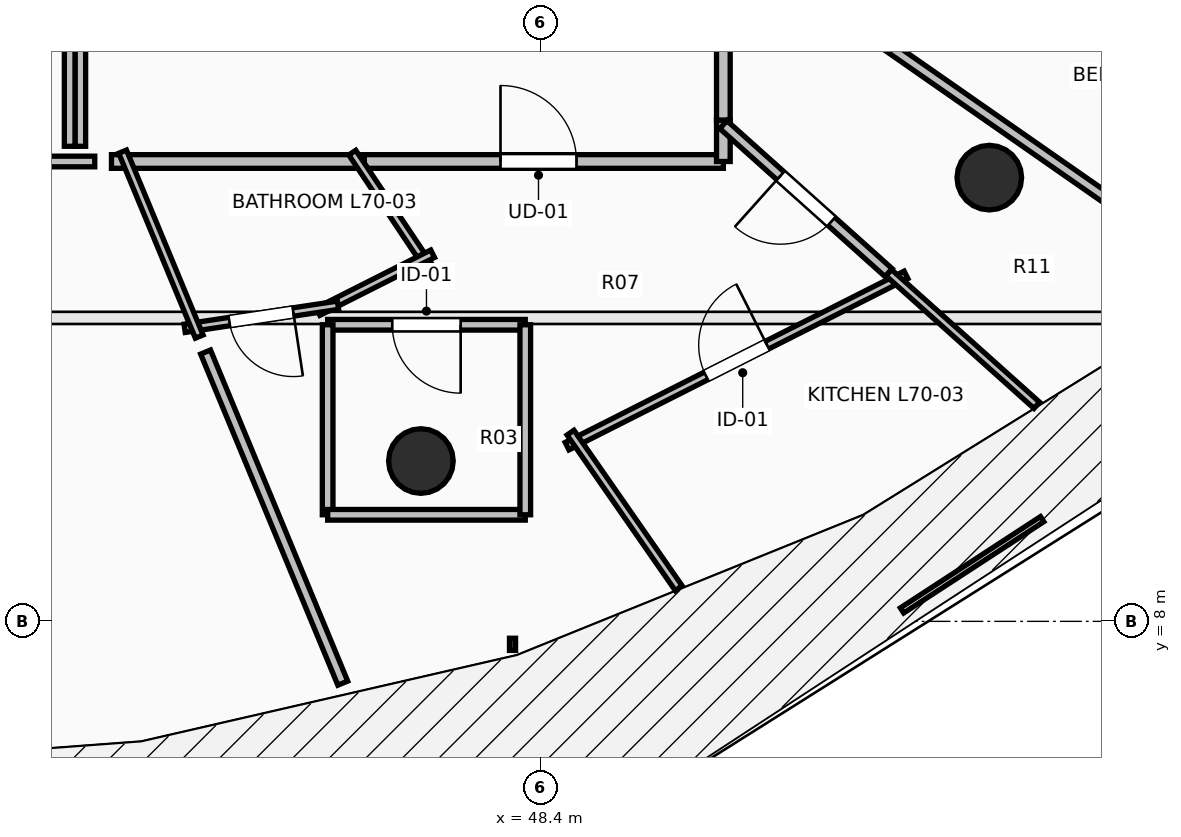
"""IFC4 building model, lengths in metres.
Left out: names, types, materials, properties, quantities, classifications, styles, units other than length and angle.
Written with IfcOpenShell. Run it as: python <this file> out.ifc"""

import sys

from ifc_helpers import new_model, si_unit, direction, frame, frame_2d, origin, origin_2d, place, context, subcontext, project, spatial, rectangle, circle, extrude, element, fill, save


model = new_model("IFC4")
c1 = context("Model", 3, precision=1e-05, world=origin(), true_north=direction((0.0, 1.0)))
c2 = subcontext(c1, "Body", "Model", "MODEL_VIEW")
j1 = project(units=[si_unit("LENGTHUNIT", "METRE"), si_unit("PLANEANGLEUNIT", "RADIAN")], contexts=[c1])
p1 = place(None, origin())
s1 = spatial("IfcSite", under=j1, at=p1, CompositionType="ELEMENT")
p2 = place(p1, origin())
s2 = spatial("IfcBuilding", under=s1, at=p2, CompositionType="ELEMENT")
p3 = place(p2, frame((0.0, 0.0, 259.1)))
s3 = spatial("IfcBuildingStorey", under=s2, at=p3, CompositionType="ELEMENT", Elevation=259.1)
for number, where, z_axis, x_axis in (
    (1, (46.821, 10.109, 0.0), (0.0, 0.0, 1.0), (0.383, -0.924, 0.0)),
    (2, (54.299, 13.838, 0.0), (0.0, 0.0, 1.0), (0.707, -0.707, 0.0)),
):
    element("IfcColumn", number, at=place(p3, frame(where, z_axis=z_axis, x_axis=x_axis)), inside=s3, PredefinedType="COLUMN", context=c2, shape_type="SweptSolid", body=[
        extrude(circle(Radius=0.425, at=origin_2d()), origin(), (0.0, 0.0, 1.0), 3.55),
    ])
p4 = place(p3, frame((45.936, 14.05, 0.0), z_axis=(0.0, 0.0, 1.0), x_axis=(1.0, 0.0, 0.0)))
e3 = element("IfcWall", 3, at=p4, inside=s3, PredefinedType="PARTITIONING", context=c2, shape_type="SweptSolid", body=[
    extrude(rectangle(XDim=4.864, YDim=0.18, at=frame_2d((2.432, 0.0))), origin(), (0.0, 0.0, 1.0), 2.482),
])
p5 = place(p4, frame((1.932, 0.0, 0.0)))
e4 = element("IfcOpeningElement", 4, at=p5, cuts=e3, PredefinedType="OPENING", context=c2, shape_type="SweptSolid", body=[
    extrude(rectangle(XDim=1.0, YDim=2.15, at=frame_2d((0.5, 1.075))), frame((0.0, 0.105, 0.0), z_axis=(0.0, -1.0, 0.0), x_axis=(1.0, 0.0, 0.0)), (0.0, 0.0, 1.0), 0.21),
])
p6 = place(p3, frame((50.8, 14.05, 0.0), z_axis=(0.0, 0.0, 1.0), x_axis=(0.0, 1.0, 0.0)))
e5 = element("IfcWall", 5, at=p6, inside=s3, PredefinedType="PARTITIONING", context=c2, shape_type="SweptSolid", body=[
    extrude(rectangle(XDim=0.545, YDim=0.18, at=frame_2d((0.272, 0.0))), origin(), (0.0, 0.0, 1.0), 3.022),
])
p7 = place(p3, frame((42.75, 14.05, 0.0), z_axis=(0.0, 0.0, 1.0), x_axis=(1.0, 0.0, 0.0)))
e6 = element("IfcWall", 6, at=p7, inside=s3, PredefinedType="PARTITIONING", context=c2, shape_type="SweptSolid", body=[
    extrude(rectangle(XDim=3.326, YDim=0.18, at=frame_2d((1.663, 0.0))), origin(), (0.0, 0.0, 1.0), 2.482),
])
p8 = place(p3, frame((50.8, 14.595, 0.0), z_axis=(0.0, 0.0, 1.0), x_axis=(0.0, 1.0, 0.0)))
e7 = element("IfcWall", 7, at=p8, inside=s3, PredefinedType="PARTITIONING", context=c2, shape_type="SweptSolid", body=[
    extrude(rectangle(XDim=2.544, YDim=0.18, at=frame_2d((1.272, 0.0))), origin(), (0.0, 0.0, 1.0), 2.482),
])
p9 = place(p3, frame((45.918, 14.167, 0.0), z_axis=(0.0, 0.0, 1.0), x_axis=(0.555785343288, -0.831325839961, 0.0)))
e8 = element("IfcWall", 8, at=p9, inside=s3, PredefinedType="PARTITIONING", context=c2, shape_type="SweptSolid", body=[
    extrude(rectangle(XDim=1.816, YDim=0.11, at=frame_2d((0.908, 0.0))), origin(), (0.0, 0.0, 1.0), 2.482),
])
p10 = place(p3, frame((46.975, 12.836, 0.0), z_axis=(0.0, 0.0, 1.0), x_axis=(-0.892715322691, -0.450621074332, 0.0)))
e9 = element("IfcWall", 9, at=p10, inside=s3, PredefinedType="PARTITIONING", context=c2, shape_type="SweptSolid", body=[
    extrude(rectangle(XDim=1.689, YDim=0.11, at=frame_2d((0.845, 0.0))), origin(), (0.0, 0.0, 1.0), 3.29),
])
p11 = place(p3, frame((45.73, 12.159, 0.0), z_axis=(0.0, 0.0, 1.0), x_axis=(-0.98887923552, -0.148720736812, 0.0)))
e10 = element("IfcWall", 10, at=p11, inside=s3, PredefinedType="PARTITIONING", context=c2, shape_type="SweptSolid", body=[
    extrude(rectangle(XDim=2.041, YDim=0.11, at=frame_2d((1.02, 0.0))), origin(), (0.0, 0.0, 1.0), 3.29),
])
p12 = place(p11, frame((0.595, 0.0, 0.0)))
e11 = element("IfcOpeningElement", 11, at=p12, cuts=e10, PredefinedType="OPENING", context=c2, shape_type="SweptSolid", body=[
    extrude(rectangle(XDim=0.85, YDim=2.1, at=frame_2d((0.425, 1.05))), frame((0.0, 0.07, 0.0), z_axis=(0.0, -1.0, 0.0), x_axis=(1.0, 0.0, 0.0)), (0.0, 0.0, 1.0), 0.14),
])
p13 = place(p3, frame((43.905, 11.747, 0.0), z_axis=(0.0, 0.0, 1.0), x_axis=(-0.38282398209, 0.923821302383, 0.0)))
e12 = element("IfcWall", 12, at=p13, inside=s3, PredefinedType="PARTITIONING", context=c2, shape_type="SweptSolid", body=[
    extrude(rectangle(XDim=2.633, YDim=0.11, at=frame_2d((1.317, 0.0))), origin(), (0.0, 0.0, 1.0), 2.482),
])
p14 = place(p3, frame((48.744, 10.305, 0.0), z_axis=(0.0, 0.0, 1.0), x_axis=(0.892523078089, 0.45100172403, 0.0)))
e13 = element("IfcWall", 13, at=p14, inside=s3, PredefinedType="PARTITIONING", context=c2, shape_type="SweptSolid", body=[
    extrude(rectangle(XDim=4.996, YDim=0.11, at=frame_2d((2.498, 0.0))), origin(), (0.0, 0.0, 1.0), 3.29),
])
p15 = place(p14, frame((2.048, 0.0, 0.0)))
e14 = element("IfcOpeningElement", 14, at=p15, cuts=e13, PredefinedType="OPENING", context=c2, shape_type="SweptSolid", body=[
    extrude(rectangle(XDim=0.9, YDim=2.1, at=frame_2d((0.45, 1.05))), frame((0.0, 0.07, 0.0), z_axis=(0.0, -1.0, 0.0), x_axis=(1.0, 0.0, 0.0)), (0.0, 0.0, 1.0), 0.14),
])
p16 = place(p3, frame((52.974, 12.588, 0.0), z_axis=(0.0, 0.0, 1.0), x_axis=(0.744980199756, -0.667086577568, 0.0)))
e15 = element("IfcWall", 15, at=p16, inside=s3, PredefinedType="PARTITIONING", context=c2, shape_type="SweptSolid", body=[
    extrude(rectangle(XDim=2.617, YDim=0.11, at=frame_2d((1.309, 0.0))), origin(), (0.0, 0.0, 1.0), 3.29),
])
p17 = place(p3, frame((50.213, 8.436, 0.0), z_axis=(0.0, 0.0, 1.0), x_axis=(-0.571041537148, 0.820921167258, 0.0)))
e16 = element("IfcWall", 16, at=p17, inside=s3, PredefinedType="PARTITIONING", context=c2, shape_type="SweptSolid", body=[
    extrude(rectangle(XDim=2.493, YDim=0.11, at=frame_2d((1.247, 0.0))), origin(), (0.0, 0.0, 1.0), 3.29),
])
p18 = place(p3, frame((48.194, 11.902, 0.0), z_axis=(0.0, 0.0, 1.0), x_axis=(-1.0, 0.0, 0.0)))
e17 = element("IfcWall", 17, at=p18, inside=s3, PredefinedType="PARTITIONING", context=c2, shape_type="SweptSolid", body=[
    extrude(rectangle(XDim=2.6, YDim=0.14, at=frame_2d((1.3, 0.0))), origin(), (0.0, 0.0, 1.0), 2.482),
])
p19 = place(p18, frame((0.85, 0.0, 0.0)))
e18 = element("IfcOpeningElement", 18, at=p19, cuts=e17, PredefinedType="OPENING", context=c2, shape_type="SweptSolid", body=[
    extrude(rectangle(XDim=0.9, YDim=2.1, at=frame_2d((0.45, 1.05))), frame((0.0, 0.085, 0.0), z_axis=(0.0, -1.0, 0.0), x_axis=(1.0, 0.0, 0.0)), (0.0, 0.0, 1.0), 0.17),
])
p20 = place(p3, frame((45.594, 11.902, 0.0), z_axis=(0.0, 0.0, 1.0), x_axis=(0.0, -1.0, 0.0)))
e19 = element("IfcWall", 19, at=p20, inside=s3, PredefinedType="PARTITIONING", context=c2, shape_type="SweptSolid", body=[
    extrude(rectangle(XDim=2.5, YDim=0.14, at=frame_2d((1.25, 0.0))), origin(), (0.0, 0.0, 1.0), 2.874),
])
p21 = place(p3, frame((45.594, 9.402, 0.0), z_axis=(0.0, 0.0, 1.0), x_axis=(1.0, 0.0, 0.0)))
e20 = element("IfcWall", 20, at=p21, inside=s3, PredefinedType="PARTITIONING", context=c2, shape_type="SweptSolid", body=[
    extrude(rectangle(XDim=2.6, YDim=0.14, at=frame_2d((1.3, 0.0))), origin(), (0.0, 0.0, 1.0), 3.29),
])
p22 = place(p3, frame((48.194, 9.402, 0.0), z_axis=(0.0, 0.0, 1.0), x_axis=(0.0, 1.0, 0.0)))
e21 = element("IfcWall", 21, at=p22, inside=s3, PredefinedType="PARTITIONING", context=c2, shape_type="SweptSolid", body=[
    extrude(rectangle(XDim=2.5, YDim=0.14, at=frame_2d((1.25, 0.0))), origin(), (0.0, 0.0, 1.0), 2.874),
])
p23 = place(p3, frame((52.974, 12.588, 0.0), z_axis=(0.0, 0.0, 1.0), x_axis=(-0.744943619707, 0.667127426702, 0.0)))
e22 = element("IfcWall", 22, at=p23, inside=s3, PredefinedType="PARTITIONING", context=c2, shape_type="SweptSolid", body=[
    extrude(rectangle(XDim=2.918, YDim=0.14, at=frame_2d((1.459, 0.0))), origin(), (0.0, 0.0, 1.0), 2.874),
])
p24 = place(p23, frame((1.009, 0.0, 0.0)))
e23 = element("IfcOpeningElement", 23, at=p24, cuts=e22, PredefinedType="OPENING", context=c2, shape_type="SweptSolid", body=[
    extrude(rectangle(XDim=0.9, YDim=2.1, at=frame_2d((0.45, 1.05))), frame((0.0, 0.085, 0.0), z_axis=(0.0, -1.0, 0.0), x_axis=(1.0, 0.0, 0.0)), (0.0, 0.0, 1.0), 0.17),
])
p25 = place(p3, frame((57.203, 12.617, 0.0), z_axis=(0.0, 0.0, 1.0), x_axis=(-0.820423513177, 0.571756293386, 0.0)))
e24 = element("IfcWall", 24, at=p25, inside=s3, PredefinedType="PARTITIONING", context=c2, shape_type="SweptSolid", body=[
    extrude(rectangle(XDim=7.804, YDim=0.14, at=frame_2d((3.902, 0.0))), origin(), (0.0, 0.0, 1.0), 2.874),
])
p26 = place(p3, frame((59.417, 14.66, 0.0), z_axis=(0.0, 0.0, 1.0), x_axis=(-0.883742233358, 0.467974000325, 0.0)))
e25 = element("IfcWall", 25, at=p26, inside=s3, PredefinedType="PARTITIONING", context=c2, shape_type="SweptSolid", body=[
    extrude(rectangle(XDim=9.75, YDim=0.14, at=frame_2d((4.875, 0.0))), origin(), (0.0, 0.0, 1.0), 2.874),
])
p27 = place(p3, frame((39.45, 14.05, 0.0), z_axis=(0.0, 0.0, 1.0), x_axis=(1.0, 0.0, 0.0)))
e26 = element("IfcWall", 26, at=p27, inside=s3, PredefinedType="PARTITIONING", context=c2, shape_type="SweptSolid", body=[
    extrude(rectangle(XDim=3.08, YDim=0.14, at=frame_2d((1.54, 0.0))), origin(), (0.0, 0.0, 1.0), 2.936),
])
for number, where, z_axis, x_axis in (
    (27, (42.34, 14.25, 0.0), (0.0, 0.0, 1.0), (0.0, 1.0, 0.0)),
    (28, (42.2, 16.1, 0.0), (0.0, 0.0, 1.0), (0.0, -1.0, 0.0)),
):
    element("IfcWall", number, at=place(p3, frame(where, z_axis=z_axis, x_axis=x_axis)), inside=s3, PredefinedType="PARTITIONING", context=c2, shape_type="SweptSolid", body=[
        extrude(rectangle(XDim=1.85, YDim=0.14, at=frame_2d((0.925, 0.0))), origin(), (0.0, 0.0, 1.0), 3.29),
    ])
p28 = place(p3, frame((43.988, 11.543, 0.0), z_axis=(0.0, 0.0, 1.0), x_axis=(0.382798409849, -0.923831898895, 0.0)))
e29 = element("IfcWall", 29, at=p28, inside=s3, PredefinedType="PARTITIONING", context=c2, shape_type="SweptSolid", body=[
    extrude(rectangle(XDim=4.715, YDim=0.14, at=frame_2d((2.357, 0.0))), origin(), (0.0, 0.0, 1.0), 2.874),
])
p29 = place(p5, origin())
e30 = element("IfcDoor", 30, at=p29, inside=s3, OperationType="SINGLE_SWING_LEFT", PredefinedType="DOOR", context=c2, shape_type="SweptSolid", body=[
    extrude(rectangle(XDim=1.0, YDim=2.15, at=frame_2d((0.5, 1.075))), frame((0.0, 0.025, 0.0), z_axis=(0.0, -1.0, 0.0), x_axis=(1.0, 0.0, 0.0)), (0.0, 0.0, 1.0), 0.05),
])
fill(e4, e30)
p30 = place(p12, origin())
e31 = element("IfcDoor", 31, at=p30, inside=s3, OperationType="SINGLE_SWING_LEFT", PredefinedType="DOOR", context=c2, shape_type="SweptSolid", body=[
    extrude(rectangle(XDim=0.85, YDim=2.1, at=frame_2d((0.425, 1.05))), frame((0.0, 0.025, 0.0), z_axis=(0.0, -1.0, 0.0), x_axis=(1.0, 0.0, 0.0)), (0.0, 0.0, 1.0), 0.05),
])
fill(e11, e31)
p31 = place(p15, origin())
e32 = element("IfcDoor", 32, at=p31, inside=s3, OperationType="SINGLE_SWING_RIGHT", PredefinedType="DOOR", context=c2, shape_type="SweptSolid", body=[
    extrude(rectangle(XDim=0.9, YDim=2.1, at=frame_2d((0.45, 1.05))), frame((0.0, 0.025, 0.0), z_axis=(0.0, -1.0, 0.0), x_axis=(1.0, 0.0, 0.0)), (0.0, 0.0, 1.0), 0.05),
])
fill(e14, e32)
p32 = place(p19, origin())
e33 = element("IfcDoor", 33, at=p32, inside=s3, OperationType="SINGLE_SWING_LEFT", PredefinedType="DOOR", context=c2, shape_type="SweptSolid", body=[
    extrude(rectangle(XDim=0.9, YDim=2.1, at=frame_2d((0.45, 1.05))), frame((0.0, 0.025, 0.0), z_axis=(0.0, -1.0, 0.0), x_axis=(1.0, 0.0, 0.0)), (0.0, 0.0, 1.0), 0.05),
])
fill(e18, e33)
p33 = place(p24, origin())
e34 = element("IfcDoor", 34, at=p33, inside=s3, OperationType="SINGLE_SWING_RIGHT", PredefinedType="DOOR", context=c2, shape_type="SweptSolid", body=[
    extrude(rectangle(XDim=0.9, YDim=2.1, at=frame_2d((0.45, 1.05))), frame((0.0, 0.025, 0.0), z_axis=(0.0, -1.0, 0.0), x_axis=(1.0, 0.0, 0.0)), (0.0, 0.0, 1.0), 0.05),
])
fill(e23, e34)
save(model, sys.argv[1])
